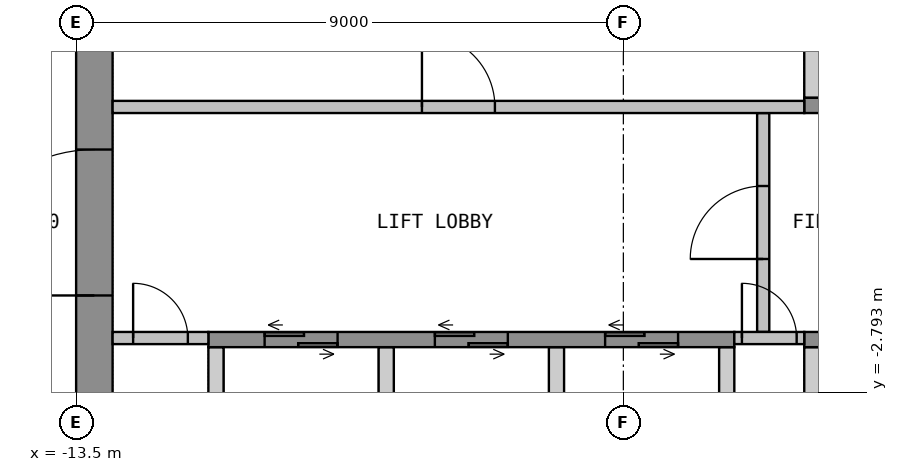
"""IFC4 building model, lengths in metres.
Left out: names, types, materials, properties, quantities, classifications, styles, units other than length and angle.
Written with IfcOpenShell. Run it as: python <this file> out.ifc"""

import sys

from ifc_helpers import new_model, si_unit, direction, frame, frame_2d, origin, place, context, subcontext, project, spatial, polyline, rectangle, outline, extrude, element, fill, save


model = new_model("IFC4")
c1 = context("Model", 3, precision=1e-05, world=origin(), true_north=direction((0.0, 1.0)))
c2 = subcontext(c1, "Body", "Model", "MODEL_VIEW")
j1 = project(units=[si_unit("LENGTHUNIT", "METRE"), si_unit("PLANEANGLEUNIT", "RADIAN")], contexts=[c1])
p1 = place(None, origin())
s1 = spatial("IfcSite", under=j1, at=p1, CompositionType="ELEMENT")
p2 = place(p1, origin())
s2 = spatial("IfcBuilding", under=s1, at=p2, CompositionType="ELEMENT")
p3 = place(p2, frame((0.0, 0.0, 282.0)))
s3 = spatial("IfcBuildingStorey", under=s2, at=p3, CompositionType="ELEMENT", Elevation=282.0)
p4 = place(p3, frame((-13.2, -10.65, 0.0), z_axis=(0.0, 0.0, 1.0), x_axis=(0.0, 1.0, 0.0)))
e1 = element("IfcWall", 1, at=p4, inside=s3, PredefinedType="SHEAR", context=c2, shape_type="SweptSolid", body=[
    extrude(rectangle(XDim=21.3, YDim=0.6, at=frame_2d((10.65, 0.0))), origin(), (0.0, 0.0, 1.0), 4.175),
])
p5 = place(p4, frame((9.45, 0.0, 0.0)))
e2 = element("IfcOpeningElement", 2, at=p5, cuts=e1, PredefinedType="OPENING", context=c2, shape_type="SweptSolid", body=[
    extrude(rectangle(XDim=2.4, YDim=2.1, at=frame_2d((1.2, 1.05))), frame((0.0, 0.31, 0.0), z_axis=(0.0, -1.0, 0.0), x_axis=(1.0, 0.0, 0.0)), (0.0, 0.0, 1.0), 0.62),
])
p6 = place(p3, origin())
e3 = element("IfcWall", 3, at=p6, inside=s3, PredefinedType="SHEAR", context=c2, shape_type="SweptSolid", body=[
    extrude(outline(polyline([(-1.525, 2.05), (-1.275, 2.05), (-1.275, 4.75), (-1.525, 4.75), (-1.525, 2.05)])), origin(), (0.0, 0.0, 1.0), 4.175),
])
p7 = place(p3, frame((-1.525, 1.925, 0.0), z_axis=(0.0, 0.0, 1.0), x_axis=(1.0, 0.0, 0.0)))
e4 = element("IfcWall", 4, at=p7, inside=s3, PredefinedType="SHEAR", context=c2, shape_type="SweptSolid", body=[
    extrude(rectangle(XDim=3.05, YDim=0.25, at=frame_2d((1.525, 0.0))), origin(), (0.0, 0.0, 1.0), 4.175),
])
p8 = place(p7, frame((0.925, 0.0, 0.0)))
e5 = element("IfcOpeningElement", 5, at=p8, cuts=e4, PredefinedType="OPENING", context=c2, shape_type="SweptSolid", body=[
    extrude(rectangle(XDim=1.2, YDim=2.1, at=frame_2d((0.6, 1.05))), frame((0.0, 0.135, 0.0), z_axis=(0.0, -1.0, 0.0), x_axis=(1.0, 0.0, 0.0)), (0.0, 0.0, 1.0), 0.27),
])
p9 = place(p3, origin())
e6 = element("IfcWall", 6, at=p9, inside=s3, PredefinedType="SHEAR", context=c2, shape_type="SweptSolid", body=[
    extrude(outline(polyline([(-11.325, -4.75), (-11.075, -4.75), (-11.075, -2.05), (-11.325, -2.05), (-11.325, -4.75)])), origin(), (0.0, 0.0, 1.0), 4.175),
])
p10 = place(p3, origin())
e7 = element("IfcWall", 7, at=p10, inside=s3, PredefinedType="SHEAR", context=c2, shape_type="SweptSolid", body=[
    extrude(outline(polyline([(-8.525, -4.75), (-8.275, -4.75), (-8.275, -2.05), (-8.525, -2.05), (-8.525, -4.75)])), origin(), (0.0, 0.0, 1.0), 4.175),
])
p11 = place(p3, origin())
e8 = element("IfcWall", 8, at=p11, inside=s3, PredefinedType="SHEAR", context=c2, shape_type="SweptSolid", body=[
    extrude(outline(polyline([(-5.725, -4.75), (-5.475, -4.75), (-5.475, -2.05), (-5.725, -2.05), (-5.725, -4.75)])), origin(), (0.0, 0.0, 1.0), 4.175),
])
p12 = place(p3, origin())
e9 = element("IfcWall", 9, at=p12, inside=s3, PredefinedType="SHEAR", context=c2, shape_type="SweptSolid", body=[
    extrude(outline(polyline([(-2.925, -4.75), (-2.675, -4.75), (-2.675, -2.05), (-2.925, -2.05), (-2.925, -4.75)])), origin(), (0.0, 0.0, 1.0), 4.175),
])
p13 = place(p3, origin())
e10 = element("IfcWall", 10, at=p13, inside=s3, PredefinedType="SHEAR", context=c2, shape_type="SweptSolid", body=[
    extrude(outline(polyline([(-1.525, -4.75), (-1.275, -4.75), (-1.275, -2.05), (-1.525, -2.05), (-1.525, -4.75)])), origin(), (0.0, 0.0, 1.0), 4.175),
])
p14 = place(p3, frame((-11.325, -1.925, 0.0), z_axis=(0.0, 0.0, 1.0), x_axis=(1.0, 0.0, 0.0)))
e11 = element("IfcWall", 11, at=p14, inside=s3, PredefinedType="SHEAR", context=c2, shape_type="SweptSolid", body=[
    extrude(rectangle(XDim=8.65, YDim=0.25, at=frame_2d((4.325, 0.0))), origin(), (0.0, 0.0, 1.0), 4.175),
])
p15 = place(p14, frame((0.925, 0.0, 0.0)))
e12 = element("IfcOpeningElement", 12, at=p15, cuts=e11, PredefinedType="OPENING", context=c2, shape_type="SweptSolid", body=[
    extrude(rectangle(XDim=1.2, YDim=2.1, at=frame_2d((0.6, 1.05))), frame((0.0, 0.135, 0.0), z_axis=(0.0, -1.0, 0.0), x_axis=(1.0, 0.0, 0.0)), (0.0, 0.0, 1.0), 0.27),
])
p16 = place(p14, frame((3.725, 0.0, 0.0)))
e13 = element("IfcOpeningElement", 13, at=p16, cuts=e11, PredefinedType="OPENING", context=c2, shape_type="SweptSolid", body=[
    extrude(rectangle(XDim=1.2, YDim=2.1, at=frame_2d((0.6, 1.05))), frame((0.0, 0.135, 0.0), z_axis=(0.0, -1.0, 0.0), x_axis=(1.0, 0.0, 0.0)), (0.0, 0.0, 1.0), 0.27),
])
p17 = place(p14, frame((6.525, 0.0, 0.0)))
e14 = element("IfcOpeningElement", 14, at=p17, cuts=e11, PredefinedType="OPENING", context=c2, shape_type="SweptSolid", body=[
    extrude(rectangle(XDim=1.2, YDim=2.1, at=frame_2d((0.6, 1.05))), frame((0.0, 0.135, 0.0), z_axis=(0.0, -1.0, 0.0), x_axis=(1.0, 0.0, 0.0)), (0.0, 0.0, 1.0), 0.27),
])
p18 = place(p3, frame((-1.525, -1.925, 0.0), z_axis=(0.0, 0.0, 1.0), x_axis=(1.0, 0.0, 0.0)))
e15 = element("IfcWall", 15, at=p18, inside=s3, PredefinedType="SHEAR", context=c2, shape_type="SweptSolid", body=[
    extrude(rectangle(XDim=5.85, YDim=0.25, at=frame_2d((2.925, 0.0))), origin(), (0.0, 0.0, 1.0), 4.175),
])
p19 = place(p18, frame((0.925, 0.0, 0.0)))
e16 = element("IfcOpeningElement", 16, at=p19, cuts=e15, PredefinedType="OPENING", context=c2, shape_type="SweptSolid", body=[
    extrude(rectangle(XDim=1.2, YDim=2.1, at=frame_2d((0.6, 1.05))), frame((0.0, 0.135, 0.0), z_axis=(0.0, -1.0, 0.0), x_axis=(1.0, 0.0, 0.0)), (0.0, 0.0, 1.0), 0.27),
])
p20 = place(p18, frame((3.725, 0.0, 0.0)))
e17 = element("IfcOpeningElement", 17, at=p20, cuts=e15, PredefinedType="OPENING", context=c2, shape_type="SweptSolid", body=[
    extrude(rectangle(XDim=1.2, YDim=2.1, at=frame_2d((0.6, 1.05))), frame((0.0, 0.135, 0.0), z_axis=(0.0, -1.0, 0.0), x_axis=(1.0, 0.0, 0.0)), (0.0, 0.0, 1.0), 0.27),
])
p21 = place(p3, frame((-2.2, -1.8, 0.0), z_axis=(0.0, 0.0, 1.0), x_axis=(0.0, 1.0, 0.0)))
e18 = element("IfcWall", 18, at=p21, inside=s3, PredefinedType="PARTITIONING", context=c2, shape_type="SweptSolid", body=[
    extrude(rectangle(XDim=3.6, YDim=0.2, at=frame_2d((1.8, 0.0))), origin(), (0.0, 0.0, 1.0), 4.175),
])
p22 = place(p21, frame((1.2, 0.0, 0.0)))
e19 = element("IfcOpeningElement", 19, at=p22, cuts=e18, PredefinedType="OPENING", context=c2, shape_type="SweptSolid", body=[
    extrude(rectangle(XDim=1.2, YDim=2.1, at=frame_2d((0.6, 1.05))), frame((0.0, 0.11, 0.0), z_axis=(0.0, -1.0, 0.0), x_axis=(1.0, 0.0, 0.0)), (0.0, 0.0, 1.0), 0.22),
])
p23 = place(p3, frame((-12.9, 1.9, 0.0), z_axis=(0.0, 0.0, 1.0), x_axis=(1.0, 0.0, 0.0)))
e20 = element("IfcWall", 20, at=p23, inside=s3, PredefinedType="PARTITIONING", context=c2, shape_type="SweptSolid", body=[
    extrude(rectangle(XDim=11.375, YDim=0.2, at=frame_2d((5.688, 0.0))), origin(), (0.0, 0.0, 1.0), 4.175),
])
p24 = place(p23, frame((5.087, 0.0, 0.0)))
e21 = element("IfcOpeningElement", 21, at=p24, cuts=e20, PredefinedType="OPENING", context=c2, shape_type="SweptSolid", body=[
    extrude(rectangle(XDim=1.2, YDim=2.1, at=frame_2d((0.6, 1.05))), frame((0.0, 0.11, 0.0), z_axis=(0.0, -1.0, 0.0), x_axis=(1.0, 0.0, 0.0)), (0.0, 0.0, 1.0), 0.22),
])
p25 = place(p3, frame((-12.9, -1.9, 0.0), z_axis=(0.0, 0.0, 1.0), x_axis=(1.0, 0.0, 0.0)))
e22 = element("IfcWall", 22, at=p25, inside=s3, PredefinedType="PARTITIONING", context=c2, shape_type="SweptSolid", body=[
    extrude(rectangle(XDim=1.575, YDim=0.2, at=frame_2d((0.788, 0.0))), origin(), (0.0, 0.0, 1.0), 4.175),
])
p26 = place(p25, frame((0.337, 0.0, 0.0)))
e23 = element("IfcOpeningElement", 23, at=p26, cuts=e22, PredefinedType="OPENING", context=c2, shape_type="SweptSolid", body=[
    extrude(rectangle(XDim=0.9, YDim=2.1, at=frame_2d((0.45, 1.05))), frame((0.0, 0.11, 0.0), z_axis=(0.0, -1.0, 0.0), x_axis=(1.0, 0.0, 0.0)), (0.0, 0.0, 1.0), 0.22),
])
p27 = place(p3, frame((-2.675, -1.9, 0.0), z_axis=(0.0, 0.0, 1.0), x_axis=(1.0, 0.0, 0.0)))
e24 = element("IfcWall", 24, at=p27, inside=s3, PredefinedType="PARTITIONING", context=c2, shape_type="SweptSolid", body=[
    extrude(rectangle(XDim=1.15, YDim=0.2, at=frame_2d((0.575, 0.0))), origin(), (0.0, 0.0, 1.0), 4.175),
])
p28 = place(p27, frame((0.125, 0.0, 0.0)))
e25 = element("IfcOpeningElement", 25, at=p28, cuts=e24, PredefinedType="OPENING", context=c2, shape_type="SweptSolid", body=[
    extrude(rectangle(XDim=0.9, YDim=2.1, at=frame_2d((0.45, 1.05))), frame((0.0, 0.11, 0.0), z_axis=(0.0, -1.0, 0.0), x_axis=(1.0, 0.0, 0.0)), (0.0, 0.0, 1.0), 0.22),
])
p29 = place(p5, origin())
e26 = element("IfcDoor", 26, at=p29, inside=s3, OperationType="DOUBLE_DOOR_DOUBLE_SWING", PredefinedType="DOOR", context=c2, shape_type="SweptSolid", body=[
    extrude(rectangle(XDim=2.4, YDim=2.1, at=frame_2d((1.2, 1.05))), frame((0.0, 0.025, 0.0), z_axis=(0.0, -1.0, 0.0), x_axis=(1.0, 0.0, 0.0)), (0.0, 0.0, 1.0), 0.05),
])
fill(e2, e26)
p30 = place(p15, origin())
e27 = element("IfcDoor", 27, at=p30, inside=s3, OperationType="DOUBLE_DOOR_SLIDING", PredefinedType="DOOR", context=c2, shape_type="SweptSolid", body=[
    extrude(rectangle(XDim=1.2, YDim=2.1, at=frame_2d((0.6, 1.05))), frame((0.0, 0.025, 0.0), z_axis=(0.0, -1.0, 0.0), x_axis=(1.0, 0.0, 0.0)), (0.0, 0.0, 1.0), 0.05),
])
fill(e12, e27)
p31 = place(p16, origin())
e28 = element("IfcDoor", 28, at=p31, inside=s3, OperationType="DOUBLE_DOOR_SLIDING", PredefinedType="DOOR", context=c2, shape_type="SweptSolid", body=[
    extrude(rectangle(XDim=1.2, YDim=2.1, at=frame_2d((0.6, 1.05))), frame((0.0, 0.025, 0.0), z_axis=(0.0, -1.0, 0.0), x_axis=(1.0, 0.0, 0.0)), (0.0, 0.0, 1.0), 0.05),
])
fill(e13, e28)
p32 = place(p17, origin())
e29 = element("IfcDoor", 29, at=p32, inside=s3, OperationType="DOUBLE_DOOR_SLIDING", PredefinedType="DOOR", context=c2, shape_type="SweptSolid", body=[
    extrude(rectangle(XDim=1.2, YDim=2.1, at=frame_2d((0.6, 1.05))), frame((0.0, 0.025, 0.0), z_axis=(0.0, -1.0, 0.0), x_axis=(1.0, 0.0, 0.0)), (0.0, 0.0, 1.0), 0.05),
])
fill(e14, e29)
p33 = place(p22, origin())
e30 = element("IfcDoor", 30, at=p33, inside=s3, OperationType="SINGLE_SWING_LEFT", PredefinedType="DOOR", context=c2, shape_type="SweptSolid", body=[
    extrude(rectangle(XDim=1.2, YDim=2.1, at=frame_2d((0.6, 1.05))), frame((0.0, 0.025, 0.0), z_axis=(0.0, -1.0, 0.0), x_axis=(1.0, 0.0, 0.0)), (0.0, 0.0, 1.0), 0.05),
])
fill(e19, e30)
p34 = place(p24, origin())
e31 = element("IfcDoor", 31, at=p34, inside=s3, OperationType="SINGLE_SWING_RIGHT", PredefinedType="DOOR", context=c2, shape_type="SweptSolid", body=[
    extrude(rectangle(XDim=1.2, YDim=2.1, at=frame_2d((0.6, 1.05))), frame((0.0, 0.025, 0.0), z_axis=(0.0, -1.0, 0.0), x_axis=(1.0, 0.0, 0.0)), (0.0, 0.0, 1.0), 0.05),
])
fill(e21, e31)
p35 = place(p26, origin())
e32 = element("IfcDoor", 32, at=p35, inside=s3, OperationType="SINGLE_SWING_LEFT", PredefinedType="DOOR", context=c2, shape_type="SweptSolid", body=[
    extrude(rectangle(XDim=0.9, YDim=2.1, at=frame_2d((0.45, 1.05))), frame((0.0, 0.025, 0.0), z_axis=(0.0, -1.0, 0.0), x_axis=(1.0, 0.0, 0.0)), (0.0, 0.0, 1.0), 0.05),
])
fill(e23, e32)
p36 = place(p28, origin())
e33 = element("IfcDoor", 33, at=p36, inside=s3, OperationType="SINGLE_SWING_LEFT", PredefinedType="DOOR", context=c2, shape_type="SweptSolid", body=[
    extrude(rectangle(XDim=0.9, YDim=2.1, at=frame_2d((0.45, 1.05))), frame((0.0, 0.025, 0.0), z_axis=(0.0, -1.0, 0.0), x_axis=(1.0, 0.0, 0.0)), (0.0, 0.0, 1.0), 0.05),
])
fill(e25, e33)
save(model, sys.argv[1])
